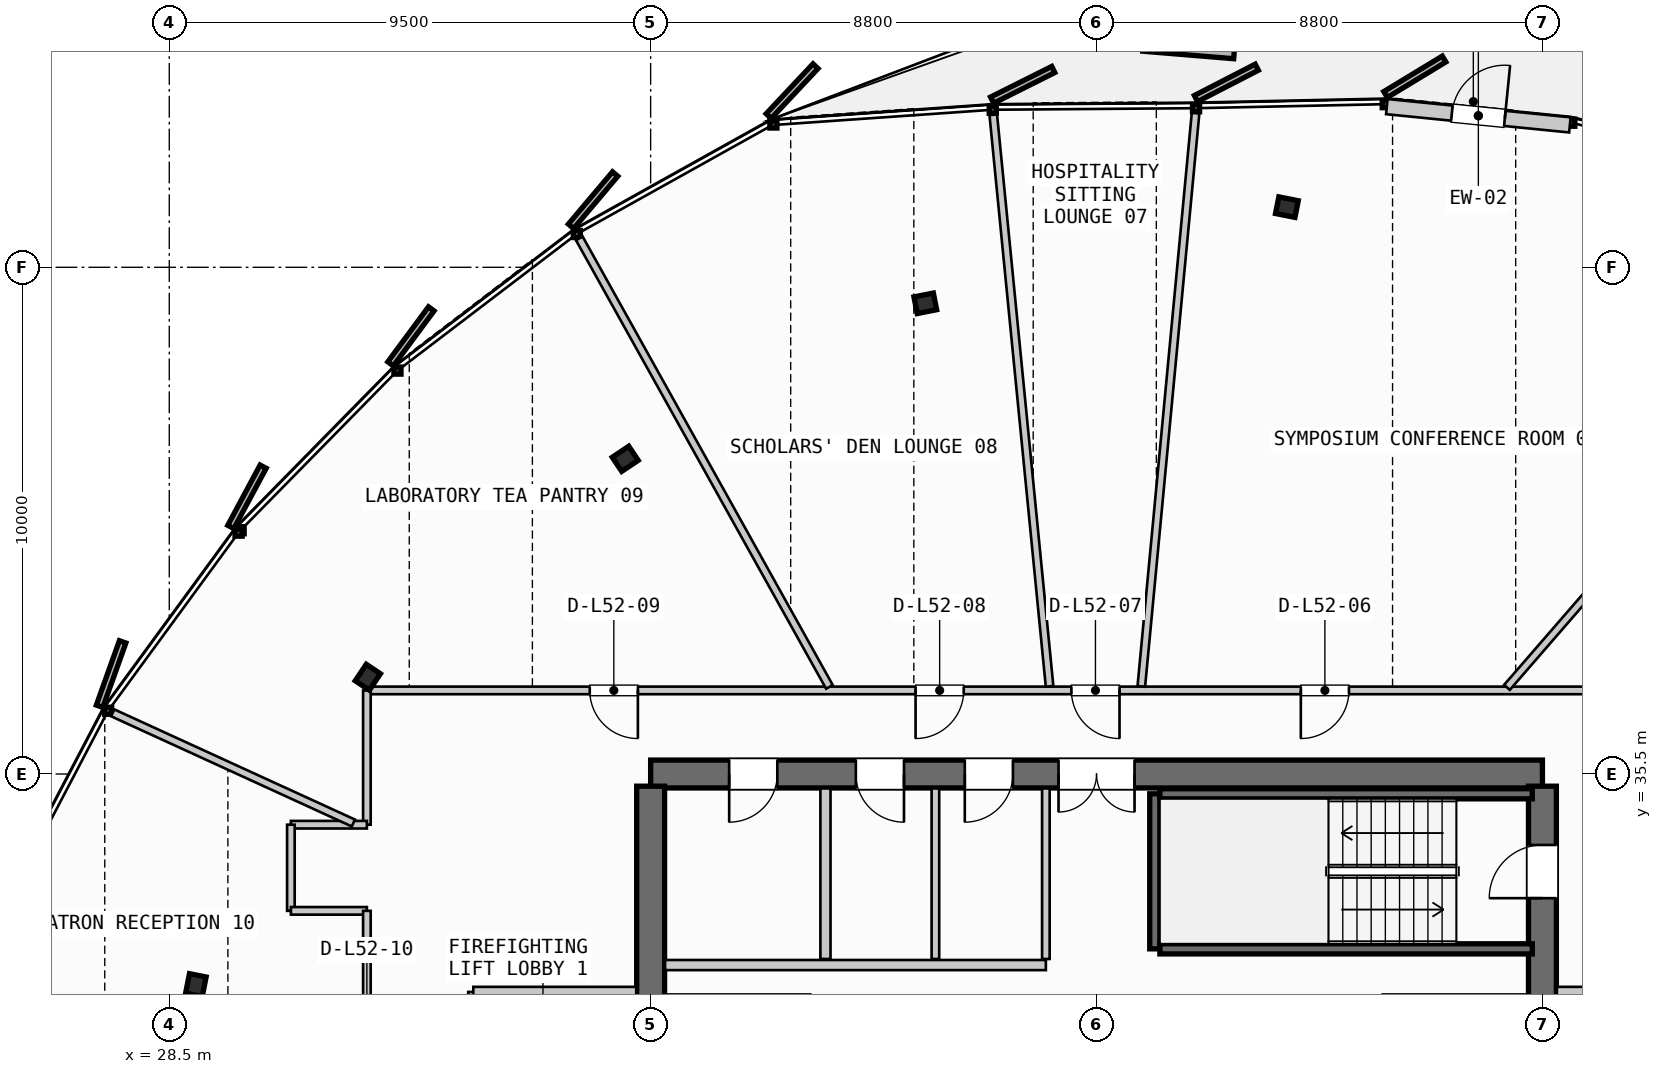
"""IFC4 building model, lengths in metres.
Left out: names, types, materials, properties, quantities, classifications, styles, units other than length and angle.
Written with IfcOpenShell. Run it as: python <this file> out.ifc"""

import sys

from ifc_helpers import new_model, si_unit, direction, frame, frame_2d, origin, origin_2d, place, context, subcontext, project, spatial, rectangle, i_section, extrude, source, transform, mapped, element, fill, save


model = new_model("IFC4")
c1 = context("Model", 3, precision=1e-05, world=origin(), true_north=direction((0.0, 1.0)))
c2 = subcontext(c1, "Body", "Model", "MODEL_VIEW")
j1 = project(units=[si_unit("LENGTHUNIT", "METRE"), si_unit("PLANEANGLEUNIT", "RADIAN")], contexts=[c1])
p1 = place(None, origin())
s1 = spatial("IfcSite", under=j1, at=p1, CompositionType="ELEMENT")
p2 = place(p1, origin())
s2 = spatial("IfcBuilding", under=s1, at=p2, CompositionType="ELEMENT")
p3 = place(p2, frame((0.0, 0.0, 200.9)))
s3 = spatial("IfcBuildingStorey", under=s2, at=p3, CompositionType="ELEMENT", Elevation=200.9)
p4 = place(p3, frame((55.6, 35.5, 0.0), z_axis=(0.0, 0.0, 1.0), x_axis=(-1.0, 0.0, 0.0)))
e1 = element("IfcWall", 1, at=p4, inside=s3, PredefinedType="SHEAR", context=c2, shape_type="SweptSolid", body=[
    extrude(rectangle(XDim=17.6, YDim=0.55, at=frame_2d((8.8, 0.0))), origin(), (0.0, 0.0, 1.0), 3.26),
])
p5 = place(p4, frame((8.05, 0.0, 0.0)))
e2 = element("IfcOpeningElement", 2, at=p5, cuts=e1, PredefinedType="OPENING", context=c2, shape_type="SweptSolid", body=[
    extrude(rectangle(XDim=1.5, YDim=2.2, at=frame_2d((0.75, 1.1))), frame((0.0, 0.285, 0.0), z_axis=(0.0, -1.0, 0.0), x_axis=(1.0, 0.0, 0.0)), (0.0, 0.0, 1.0), 0.57),
])
p6 = place(p4, frame((15.1, 0.0, 0.0)))
e3 = element("IfcOpeningElement", 3, at=p6, cuts=e1, PredefinedType="OPENING", context=c2, shape_type="SweptSolid", body=[
    extrude(rectangle(XDim=0.95, YDim=2.15, at=frame_2d((0.475, 1.075))), frame((0.0, 0.285, 0.0), z_axis=(0.0, -1.0, 0.0), x_axis=(1.0, 0.0, 0.0)), (0.0, 0.0, 1.0), 0.57),
])
p7 = place(p4, frame((12.6, 0.0, 0.0)))
e4 = element("IfcOpeningElement", 4, at=p7, cuts=e1, PredefinedType="OPENING", context=c2, shape_type="SweptSolid", body=[
    extrude(rectangle(XDim=0.95, YDim=2.15, at=frame_2d((0.475, 1.075))), frame((0.0, 0.285, 0.0), z_axis=(0.0, -1.0, 0.0), x_axis=(1.0, 0.0, 0.0)), (0.0, 0.0, 1.0), 0.57),
])
p8 = place(p4, frame((10.45, 0.0, 0.0)))
e5 = element("IfcOpeningElement", 5, at=p8, cuts=e1, PredefinedType="OPENING", context=c2, shape_type="SweptSolid", body=[
    extrude(rectangle(XDim=0.95, YDim=2.15, at=frame_2d((0.475, 1.075))), frame((0.0, 0.285, 0.0), z_axis=(0.0, -1.0, 0.0), x_axis=(1.0, 0.0, 0.0)), (0.0, 0.0, 1.0), 0.57),
])
p9 = place(p3, frame((38.0, 35.26, 0.0), z_axis=(0.0, 0.0, 1.0), x_axis=(0.0, -1.0, 0.0)))
e6 = element("IfcWall", 6, at=p9, inside=s3, PredefinedType="SHEAR", context=c2, shape_type="SweptSolid", body=[
    extrude(rectangle(XDim=14.92, YDim=0.55, at=frame_2d((7.46, 0.0))), origin(), (0.0, 0.0, 1.0), 3.26),
])
p10 = place(p9, frame((5.21, 0.0, 0.0)))
e7 = element("IfcOpeningElement", 7, at=p10, cuts=e6, PredefinedType="OPENING", context=c2, shape_type="SweptSolid", body=[
    extrude(rectangle(XDim=1.1, YDim=2.2, at=frame_2d((0.55, 1.1))), frame((0.0, 0.285, 0.0), z_axis=(0.0, -1.0, 0.0), x_axis=(1.0, 0.0, 0.0)), (0.0, 0.0, 1.0), 0.57),
])
p11 = place(p3, frame((55.6, 20.34, 0.0), z_axis=(0.0, 0.0, 1.0), x_axis=(0.0, 1.0, 0.0)))
e8 = element("IfcWall", 8, at=p11, inside=s3, PredefinedType="SHEAR", context=c2, shape_type="SweptSolid", body=[
    extrude(rectangle(XDim=14.92, YDim=0.55, at=frame_2d((7.46, 0.0))), origin(), (0.0, 0.0, 1.0), 3.26),
])
p12 = place(p11, frame((12.71, 0.0, 0.0)))
e9 = element("IfcOpeningElement", 9, at=p12, cuts=e8, PredefinedType="OPENING", context=c2, shape_type="SweptSolid", body=[
    extrude(rectangle(XDim=1.05, YDim=2.15, at=frame_2d((0.525, 1.075))), frame((0.0, 0.285, 0.0), z_axis=(0.0, -1.0, 0.0), x_axis=(1.0, 0.0, 0.0)), (0.0, 0.0, 1.0), 0.57),
])
p13 = place(p11, frame((8.61, 0.0, 0.0)))
e10 = element("IfcOpeningElement", 10, at=p13, cuts=e8, PredefinedType="OPENING", context=c2, shape_type="SweptSolid", body=[
    extrude(rectangle(XDim=1.1, YDim=2.2, at=frame_2d((0.55, 1.1))), frame((0.0, 0.285, 0.0), z_axis=(0.0, -1.0, 0.0), x_axis=(1.0, 0.0, 0.0)), (0.0, 0.0, 1.0), 0.57),
])
m1 = source(origin(), c2, "Body", "SweptSolid", [
    extrude(i_section(OverallWidth=0.391, OverallDepth=0.335, WebThickness=0.023, FlangeThickness=0.034, FilletRadius=0.015, at=origin_2d()), origin(), (0.0, 0.0, 1.0), 3.26),
])
for number, where, z_axis, x_axis in (
    (11, (50.557, 46.688, 0.0), (0.0, 0.0, 1.0), (0.195, 0.981, 0.0)),
    (12, (43.421, 44.789, 0.0), (0.0, 0.0, 1.0), (-0.195, 0.981, 0.0)),
    (13, (37.499, 41.72, 0.0), (0.0, 0.0, 1.0), (-0.556, 0.831, 0.0)),
    (14, (32.418, 37.409, 0.0), (0.0, 0.0, 1.0), (-0.831, 0.556, 0.0)),
    (15, (29.025, 31.336, 0.0), (0.0, 0.0, 1.0), (-0.981, 0.195, 0.0)),
):
    element("IfcColumn", number, at=place(p3, frame(where, z_axis=z_axis, x_axis=x_axis)), inside=s3, PredefinedType="COLUMN", context=c2, shape_type="MappedRepresentation", body=[
        mapped(m1, transform((0.0, 0.0, 0.0), scale=1.0)),
    ])
p14 = place(p3, frame((52.529, 48.671, 0.0), z_axis=(0.0, 0.0, 1.0), x_axis=(0.995043844686, -0.099437151776, 0.0)))
e16 = element("IfcWall", 16, at=p14, inside=s3, PredefinedType="SOLIDWALL", context=c2, shape_type="SweptSolid", body=[
    extrude(rectangle(XDim=3.631, YDim=0.3, at=frame_2d((1.816, 0.0))), origin(), (0.0, 0.0, 1.0), 2.735),
])
p15 = place(p14, frame((1.291, 0.0, 0.0)))
e17 = element("IfcOpeningElement", 17, at=p15, cuts=e16, PredefinedType="OPENING", context=c2, shape_type="SweptSolid", body=[
    extrude(rectangle(XDim=1.05, YDim=2.2, at=frame_2d((0.525, 1.1))), frame((0.0, 0.16, 0.0), z_axis=(0.0, -1.0, 0.0), x_axis=(1.0, 0.0, 0.0)), (0.0, 0.0, 1.0), 0.32),
])
p16 = place(p3, frame((47.95, 32.05, 0.0), z_axis=(0.0, 0.0, 1.0), x_axis=(0.0, 1.0, 0.0)))
e18 = element("IfcWall", 18, at=p16, inside=s3, PredefinedType="SHEAR", context=c2, shape_type="SweptSolid", body=[
    extrude(rectangle(XDim=3.06, YDim=0.2, at=frame_2d((1.53, 0.0))), origin(), (0.0, 0.0, 1.0), 3.26),
])
for number, where, z_axis, x_axis in (
    (19, (48.05, 35.11, 0.0), (0.0, 0.0, 1.0), (1.0, 0.0, 0.0)),
    (20, (55.4, 32.05, 0.0), (0.0, 0.0, 1.0), (-1.0, 0.0, 0.0)),
):
    element("IfcWall", number, at=place(p3, frame(where, z_axis=z_axis, x_axis=x_axis)), inside=s3, PredefinedType="SHEAR", context=c2, shape_type="SweptSolid", body=[
        extrude(rectangle(XDim=7.35, YDim=0.2, at=frame_2d((3.675, 0.0))), origin(), (0.0, 0.0, 1.0), 3.26),
    ])
p17 = place(p3, frame((38.285, 31.05, 0.0), z_axis=(0.0, 0.0, 1.0), x_axis=(1.0, 0.0, 0.0)))
e21 = element("IfcWall", 21, at=p17, inside=s3, PredefinedType="PARTITIONING", context=c2, shape_type="SweptSolid", body=[
    extrude(rectangle(XDim=2.865, YDim=0.2, at=frame_2d((1.433, 0.0))), origin(), (0.0, 0.0, 1.0), 2.595),
])
p18 = place(p3, frame((34.5, 31.2, 0.0), z_axis=(0.0, 0.0, 1.0), x_axis=(0.0, -1.0, 0.0)))
e22 = element("IfcWall", 22, at=p18, inside=s3, PredefinedType="PARTITIONING", context=c2, shape_type="SweptSolid", body=[
    extrude(rectangle(XDim=4.4, YDim=0.2, at=frame_2d((2.2, 0.0))), origin(), (0.0, 0.0, 1.0), 2.595),
])
p19 = place(p18, frame((1.65, 0.0, 0.0)))
e23 = element("IfcOpeningElement", 23, at=p19, cuts=e22, PredefinedType="OPENING", context=c2, shape_type="SweptSolid", body=[
    extrude(rectangle(XDim=1.05, YDim=2.15, at=frame_2d((0.525, 1.075))), frame((0.0, 0.11, 0.0), z_axis=(0.0, -1.0, 0.0), x_axis=(1.0, 0.0, 0.0)), (0.0, 0.0, 1.0), 0.22),
])
p20 = place(p3, frame((34.5, 31.2, 0.0), z_axis=(0.0, 0.0, 1.0), x_axis=(1.0, 0.0, 0.0)))
e24 = element("IfcWall", 24, at=p20, inside=s3, PredefinedType="PARTITIONING", context=c2, shape_type="SweptSolid", body=[
    extrude(rectangle(XDim=3.215, YDim=0.2, at=frame_2d((1.607, 0.0))), origin(), (0.0, 0.0, 1.0), 2.595),
])
p21 = place(p3, frame((52.45, 31.05, 0.0), z_axis=(0.0, 0.0, 1.0), x_axis=(1.0, 0.0, 0.0)))
e25 = element("IfcWall", 25, at=p21, inside=s3, PredefinedType="PARTITIONING", context=c2, shape_type="SweptSolid", body=[
    extrude(rectangle(XDim=2.865, YDim=0.2, at=frame_2d((1.433, 0.0))), origin(), (0.0, 0.0, 1.0), 2.595),
])
p22 = place(p3, frame((55.885, 31.2, 0.0), z_axis=(0.0, 0.0, 1.0), x_axis=(1.0, 0.0, 0.0)))
e26 = element("IfcWall", 26, at=p22, inside=s3, PredefinedType="PARTITIONING", context=c2, shape_type="SweptSolid", body=[
    extrude(rectangle(XDim=3.215, YDim=0.2, at=frame_2d((1.607, 0.0))), origin(), (0.0, 0.0, 1.0), 2.595),
])
p23 = place(p3, frame((41.45, 31.85, 0.0), z_axis=(0.0, 0.0, 1.0), x_axis=(0.0, 1.0, 0.0)))
e27 = element("IfcWall", 27, at=p23, inside=s3, PredefinedType="PARTITIONING", context=c2, shape_type="SweptSolid", body=[
    extrude(rectangle(XDim=3.365, YDim=0.2, at=frame_2d((1.683, 0.0))), origin(), (0.0, 0.0, 1.0), 2.595),
])
p24 = place(p3, frame((38.285, 31.73, 0.0), z_axis=(0.0, 0.0, 1.0), x_axis=(1.0, 0.0, 0.0)))
e28 = element("IfcWall", 28, at=p24, inside=s3, PredefinedType="PARTITIONING", context=c2, shape_type="SweptSolid", body=[
    extrude(rectangle(XDim=7.515, YDim=0.2, at=frame_2d((3.758, 0.0))), origin(), (0.0, 0.0, 1.0), 2.595),
])
p25 = place(p3, frame((45.8, 31.85, 0.0), z_axis=(0.0, 0.0, 1.0), x_axis=(0.0, 1.0, 0.0)))
e29 = element("IfcWall", 29, at=p25, inside=s3, PredefinedType="PARTITIONING", context=c2, shape_type="SweptSolid", body=[
    extrude(rectangle(XDim=3.365, YDim=0.15, at=frame_2d((1.683, 0.0))), origin(), (0.0, 0.0, 1.0), 2.595),
])
p26 = place(p3, frame((43.62, 31.85, 0.0), z_axis=(0.0, 0.0, 1.0), x_axis=(0.0, 1.0, 0.0)))
e30 = element("IfcWall", 30, at=p26, inside=s3, PredefinedType="PLUMBINGWALL", context=c2, shape_type="SweptSolid", body=[
    extrude(rectangle(XDim=3.365, YDim=0.15, at=frame_2d((1.683, 0.0))), origin(), (0.0, 0.0, 1.0), 2.595),
])
p27 = place(p3, frame((60.75, 37.15, 0.0), z_axis=(0.0, 0.0, 1.0), x_axis=(-1.0, 0.0, 0.0)))
e31 = element("IfcWall", 31, at=p27, inside=s3, PredefinedType="PARTITIONING", context=c2, shape_type="SweptSolid", body=[
    extrude(rectangle(XDim=28.35, YDim=0.15, at=frame_2d((14.175, 0.0))), origin(), (0.0, 0.0, 1.0), 2.595),
])
p28 = place(p27, frame((2.766, 0.0, 0.0)))
e32 = element("IfcOpeningElement", 32, at=p28, cuts=e31, PredefinedType="OPENING", context=c2, shape_type="SweptSolid", body=[
    extrude(rectangle(XDim=0.95, YDim=2.15, at=frame_2d((0.475, 1.075))), frame((0.0, 0.085, 0.0), z_axis=(0.0, -1.0, 0.0), x_axis=(1.0, 0.0, 0.0)), (0.0, 0.0, 1.0), 0.17),
])
p29 = place(p27, frame((8.968, 0.0, 0.0)))
e33 = element("IfcOpeningElement", 33, at=p29, cuts=e31, PredefinedType="OPENING", context=c2, shape_type="SweptSolid", body=[
    extrude(rectangle(XDim=0.95, YDim=2.15, at=frame_2d((0.475, 1.075))), frame((0.0, 0.085, 0.0), z_axis=(0.0, -1.0, 0.0), x_axis=(1.0, 0.0, 0.0)), (0.0, 0.0, 1.0), 0.17),
])
p30 = place(p27, frame((13.496, 0.0, 0.0)))
e34 = element("IfcOpeningElement", 34, at=p30, cuts=e31, PredefinedType="OPENING", context=c2, shape_type="SweptSolid", body=[
    extrude(rectangle(XDim=0.95, YDim=2.15, at=frame_2d((0.475, 1.075))), frame((0.0, 0.085, 0.0), z_axis=(0.0, -1.0, 0.0), x_axis=(1.0, 0.0, 0.0)), (0.0, 0.0, 1.0), 0.17),
])
p31 = place(p27, frame((16.571, 0.0, 0.0)))
e35 = element("IfcOpeningElement", 35, at=p31, cuts=e31, PredefinedType="OPENING", context=c2, shape_type="SweptSolid", body=[
    extrude(rectangle(XDim=0.95, YDim=2.15, at=frame_2d((0.475, 1.075))), frame((0.0, 0.085, 0.0), z_axis=(0.0, -1.0, 0.0), x_axis=(1.0, 0.0, 0.0)), (0.0, 0.0, 1.0), 0.17),
])
p32 = place(p27, frame((23.002, 0.0, 0.0)))
e36 = element("IfcOpeningElement", 36, at=p32, cuts=e31, PredefinedType="OPENING", context=c2, shape_type="SweptSolid", body=[
    extrude(rectangle(XDim=0.95, YDim=2.15, at=frame_2d((0.475, 1.075))), frame((0.0, 0.085, 0.0), z_axis=(0.0, -1.0, 0.0), x_axis=(1.0, 0.0, 0.0)), (0.0, 0.0, 1.0), 0.17),
])
p33 = place(p3, frame((32.4, 37.15, 0.0), z_axis=(0.0, 0.0, 1.0), x_axis=(0.0, -1.0, 0.0)))
e37 = element("IfcWall", 37, at=p33, inside=s3, PredefinedType="PARTITIONING", context=c2, shape_type="SweptSolid", body=[
    extrude(rectangle(XDim=2.65, YDim=0.15, at=frame_2d((1.325, 0.0))), origin(), (0.0, 0.0, 1.0), 2.595),
])
p34 = place(p3, frame((32.4, 34.5, 0.0), z_axis=(0.0, 0.0, 1.0), x_axis=(-1.0, 0.0, 0.0)))
e38 = element("IfcWall", 38, at=p34, inside=s3, PredefinedType="PARTITIONING", context=c2, shape_type="SweptSolid", body=[
    extrude(rectangle(XDim=1.5, YDim=0.15, at=frame_2d((0.75, 0.0))), origin(), (0.0, 0.0, 1.0), 2.595),
])
p35 = place(p3, frame((30.9, 34.5, 0.0), z_axis=(0.0, 0.0, 1.0), x_axis=(0.0, -1.0, 0.0)))
e39 = element("IfcWall", 39, at=p35, inside=s3, PredefinedType="PARTITIONING", context=c2, shape_type="SweptSolid", body=[
    extrude(rectangle(XDim=1.7, YDim=0.15, at=frame_2d((0.85, 0.0))), origin(), (0.0, 0.0, 1.0), 2.595),
])
p36 = place(p3, frame((30.9, 32.8, 0.0), z_axis=(0.0, 0.0, 1.0), x_axis=(1.0, 0.0, 0.0)))
e40 = element("IfcWall", 40, at=p36, inside=s3, PredefinedType="PARTITIONING", context=c2, shape_type="SweptSolid", body=[
    extrude(rectangle(XDim=1.5, YDim=0.15, at=frame_2d((0.75, 0.0))), origin(), (0.0, 0.0, 1.0), 2.595),
])
p37 = place(p3, frame((32.4, 32.8, 0.0), z_axis=(0.0, 0.0, 1.0), x_axis=(0.0, -1.0, 0.0)))
e41 = element("IfcWall", 41, at=p37, inside=s3, PredefinedType="PARTITIONING", context=c2, shape_type="SweptSolid", body=[
    extrude(rectangle(XDim=10.0, YDim=0.15, at=frame_2d((5.0, 0.0))), origin(), (0.0, 0.0, 1.0), 2.595),
])
p38 = place(p37, frame((1.946, 0.0, 0.0)))
e42 = element("IfcOpeningElement", 42, at=p38, cuts=e41, PredefinedType="OPENING", context=c2, shape_type="SweptSolid", body=[
    extrude(rectangle(XDim=0.95, YDim=2.15, at=frame_2d((0.475, 1.075))), frame((0.0, 0.085, 0.0), z_axis=(0.0, -1.0, 0.0), x_axis=(1.0, 0.0, 0.0)), (0.0, 0.0, 1.0), 0.17),
])
p39 = place(p37, frame((6.366, 0.0, 0.0)))
e43 = element("IfcOpeningElement", 43, at=p39, cuts=e41, PredefinedType="OPENING", context=c2, shape_type="SweptSolid", body=[
    extrude(rectangle(XDim=0.95, YDim=2.15, at=frame_2d((0.475, 1.075))), frame((0.0, 0.085, 0.0), z_axis=(0.0, -1.0, 0.0), x_axis=(1.0, 0.0, 0.0)), (0.0, 0.0, 1.0), 0.17),
])
p40 = place(p3, frame((54.9, 37.21, 0.0), z_axis=(0.0, 0.0, 1.0), x_axis=(0.655252574178, 0.75540986493, 0.0)))
e44 = element("IfcWall", 44, at=p40, inside=s3, PredefinedType="PARTITIONING", context=c2, shape_type="SweptSolid", body=[
    extrude(rectangle(XDim=12.322, YDim=0.15, at=frame_2d((6.161, 0.0))), origin(), (0.0, 0.0, 1.0), 2.595),
])
p41 = place(p3, frame((47.684, 37.229, 0.0), z_axis=(0.0, 0.0, 1.0), x_axis=(0.094251326159, 0.995548435546, 0.0)))
e45 = element("IfcWall", 45, at=p41, inside=s3, PredefinedType="PARTITIONING", context=c2, shape_type="SweptSolid", body=[
    extrude(rectangle(XDim=11.361, YDim=0.15, at=frame_2d((5.681, 0.0))), origin(), (0.0, 0.0, 1.0), 2.595),
])
p42 = place(p3, frame((45.873, 37.229, 0.0), z_axis=(0.0, 0.0, 1.0), x_axis=(-0.098044940059, 0.995181988246, 0.0)))
e46 = element("IfcWall", 46, at=p42, inside=s3, PredefinedType="PARTITIONING", context=c2, shape_type="SweptSolid", body=[
    extrude(rectangle(XDim=11.335, YDim=0.15, at=frame_2d((5.667, 0.0))), origin(), (0.0, 0.0, 1.0), 2.595),
])
p43 = place(p3, frame((41.528, 37.22, 0.0), z_axis=(0.0, 0.0, 1.0), x_axis=(-0.487080330206, 0.873357173169, 0.0)))
e47 = element("IfcWall", 47, at=p43, inside=s3, PredefinedType="PARTITIONING", context=c2, shape_type="SweptSolid", body=[
    extrude(rectangle(XDim=10.134, YDim=0.15, at=frame_2d((5.067, 0.0))), origin(), (0.0, 0.0, 1.0), 2.595),
])
p44 = place(p3, frame((32.133, 34.533, 0.0), z_axis=(0.0, 0.0, 1.0), x_axis=(-0.909241040679, 0.416270020474, 0.0)))
e48 = element("IfcWall", 48, at=p44, inside=s3, PredefinedType="PARTITIONING", context=c2, shape_type="SweptSolid", body=[
    extrude(rectangle(XDim=5.223, YDim=0.15, at=frame_2d((2.612, 0.0))), origin(), (0.0, 0.0, 1.0), 2.595),
])
m2 = source(origin(), c2, "Body", "SweptSolid", [
    extrude(rectangle(XDim=1.05, YDim=2.2, at=frame_2d((0.525, 1.1))), frame((0.0, 0.025, 0.0), z_axis=(0.0, -1.0, 0.0), x_axis=(1.0, 0.0, 0.0)), (0.0, 0.0, 1.0), 0.05),
])
p45 = place(p15, origin())
e49 = element("IfcDoor", 49, at=p45, inside=s3, OperationType="SINGLE_SWING_RIGHT", PredefinedType="DOOR", context=c2, shape_type="MappedRepresentation", body=[
    mapped(m2, transform((0.0, 0.0, 0.0), scale=1.0)),
])
fill(e17, e49)
m3 = source(origin(), c2, "Body", "SweptSolid", [
    extrude(rectangle(XDim=1.05, YDim=2.15, at=frame_2d((0.525, 1.075))), frame((0.0, 0.025, 0.0), z_axis=(0.0, -1.0, 0.0), x_axis=(1.0, 0.0, 0.0)), (0.0, 0.0, 1.0), 0.05),
])
p46 = place(p12, origin())
e50 = element("IfcDoor", 50, at=p46, inside=s3, OperationType="SINGLE_SWING_LEFT", PredefinedType="DOOR", context=c2, shape_type="MappedRepresentation", body=[
    mapped(m3, transform((0.0, 0.0, 0.0), scale=1.0)),
])
fill(e9, e50)
m4 = source(origin(), c2, "Body", "SweptSolid", [
    extrude(rectangle(XDim=1.5, YDim=2.2, at=frame_2d((0.75, 1.1))), frame((0.0, 0.025, 0.0), z_axis=(0.0, -1.0, 0.0), x_axis=(1.0, 0.0, 0.0)), (0.0, 0.0, 1.0), 0.05),
])
p47 = place(p5, origin())
e51 = element("IfcDoor", 51, at=p47, inside=s3, OperationType="DOUBLE_DOOR_SINGLE_SWING", PredefinedType="DOOR", context=c2, shape_type="MappedRepresentation", body=[
    mapped(m4, transform((0.0, 0.0, 0.0), scale=1.0)),
])
fill(e2, e51)
m5 = source(origin(), c2, "Body", "SweptSolid", [
    extrude(rectangle(XDim=0.95, YDim=2.15, at=frame_2d((0.475, 1.075))), frame((0.0, 0.025, 0.0), z_axis=(0.0, -1.0, 0.0), x_axis=(1.0, 0.0, 0.0)), (0.0, 0.0, 1.0), 0.05),
])
p48 = place(p6, origin())
e52 = element("IfcDoor", 52, at=p48, inside=s3, OperationType="SINGLE_SWING_RIGHT", PredefinedType="DOOR", context=c2, shape_type="MappedRepresentation", body=[
    mapped(m5, transform((0.0, 0.0, 0.0), scale=1.0)),
])
fill(e3, e52)
p49 = place(p7, origin())
e53 = element("IfcDoor", 53, at=p49, inside=s3, OperationType="SINGLE_SWING_LEFT", PredefinedType="DOOR", context=c2, shape_type="MappedRepresentation", body=[
    mapped(m5, transform((0.0, 0.0, 0.0), scale=1.0)),
])
fill(e4, e53)
p50 = place(p8, origin())
e54 = element("IfcDoor", 54, at=p50, inside=s3, OperationType="SINGLE_SWING_RIGHT", PredefinedType="DOOR", context=c2, shape_type="MappedRepresentation", body=[
    mapped(m5, transform((0.0, 0.0, 0.0), scale=1.0)),
])
fill(e5, e54)
p51 = place(p29, origin())
e55 = element("IfcDoor", 55, at=p51, inside=s3, OperationType="SINGLE_SWING_RIGHT", PredefinedType="DOOR", context=c2, shape_type="MappedRepresentation", body=[
    mapped(m5, transform((0.0, 0.0, 0.0), scale=1.0)),
])
fill(e33, e55)
p52 = place(p30, origin())
e56 = element("IfcDoor", 56, at=p52, inside=s3, OperationType="SINGLE_SWING_LEFT", PredefinedType="DOOR", context=c2, shape_type="MappedRepresentation", body=[
    mapped(m5, transform((0.0, 0.0, 0.0), scale=1.0)),
])
fill(e34, e56)
p53 = place(p31, origin())
e57 = element("IfcDoor", 57, at=p53, inside=s3, OperationType="SINGLE_SWING_RIGHT", PredefinedType="DOOR", context=c2, shape_type="MappedRepresentation", body=[
    mapped(m5, transform((0.0, 0.0, 0.0), scale=1.0)),
])
fill(e35, e57)
p54 = place(p32, origin())
e58 = element("IfcDoor", 58, at=p54, inside=s3, OperationType="SINGLE_SWING_LEFT", PredefinedType="DOOR", context=c2, shape_type="MappedRepresentation", body=[
    mapped(m5, transform((0.0, 0.0, 0.0), scale=1.0)),
])
fill(e36, e58)
save(model, sys.argv[1])
